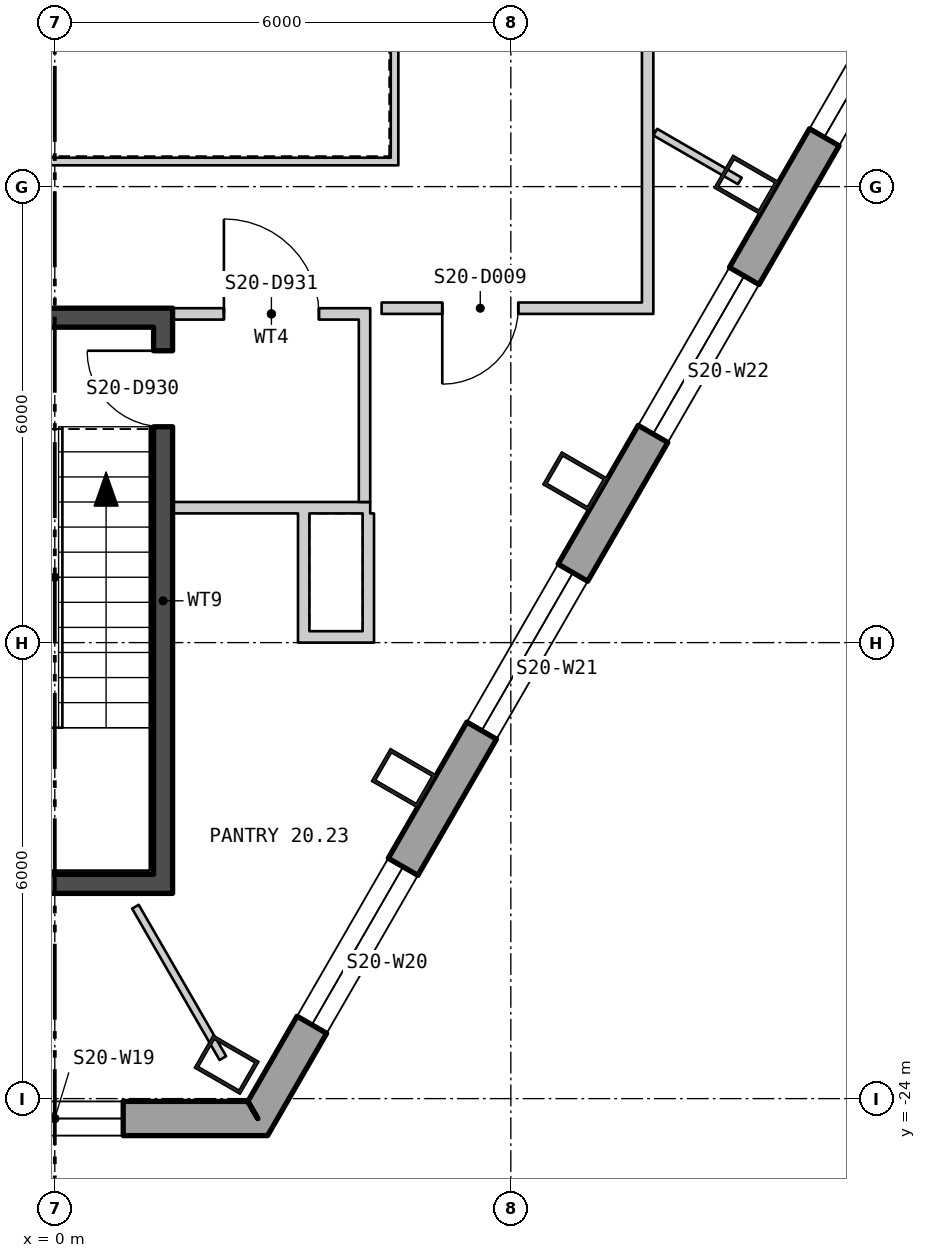
"""IFC4 building model, lengths in metres.
Left out: names, types, materials, properties, quantities, classifications, styles, units other than length and angle.
Written with IfcOpenShell. Run it as: python <this file> out.ifc"""

import sys

from ifc_helpers import new_model, si_unit, direction, frame, frame_2d, origin, origin_2d, place, context, subcontext, project, spatial, polyline, rectangle, hollow_rectangle, outline, extrude, element, fill, save


model = new_model("IFC4")
c1 = context("Model", 3, precision=1e-05, world=origin(), true_north=direction((0.0, 1.0)))
c2 = subcontext(c1, "Body", "Model", "MODEL_VIEW")
j1 = project(units=[si_unit("LENGTHUNIT", "METRE"), si_unit("PLANEANGLEUNIT", "RADIAN")], contexts=[c1])
p1 = place(None, origin())
s1 = spatial("IfcSite", under=j1, at=p1, CompositionType="ELEMENT")
p2 = place(p1, origin())
s2 = spatial("IfcBuilding", under=s1, at=p2, CompositionType="ELEMENT")
p3 = place(p2, frame((0.0, 0.0, 268.8)))
s3 = spatial("IfcBuildingStorey", under=s2, at=p3, CompositionType="ELEMENT", Elevation=268.8)
for number, where, z_axis, x_axis in (
    (1, (2.261, -23.554, 0.0), (0.0, 0.0, 1.0), (0.5, 0.866, 0.0)),
    (2, (4.592, -19.783, 0.0), (0.0, 0.0, 1.0), (0.5, 0.866, 0.0)),
    (3, (6.846, -15.879, 0.0), (0.0, 0.0, 1.0), (0.5, 0.866, 0.0)),
    (4, (9.1, -11.976, 0.0), (0.0, 0.0, 1.0), (0.5, 0.866, 0.0)),
):
    element("IfcColumn", number, at=place(p3, frame(where, z_axis=z_axis, x_axis=x_axis)), inside=s3, PredefinedType="COLUMN", context=c2, shape_type="SweptSolid", body=[
        extrude(hollow_rectangle(XDim=0.5, YDim=0.7, WallThickness=0.045, at=origin_2d()), origin(), (0.0, 0.0, 1.0), 3.9),
    ])
p4 = place(p3, frame((-2.67, -24.262, -0.18), z_axis=(0.0, 0.0, 1.0), x_axis=(1.0, 0.0, 0.0)))
e5 = element("IfcWall", 5, at=p4, inside=s3, PredefinedType="SOLIDWALL", context=c2, shape_type="SweptSolid", body=[
    extrude(outline(polyline([(-0.13, -0.225), (5.47, -0.225), (5.21, 0.225), (0.13, 0.225), (-0.13, -0.225)])), origin(), (0.0, 0.0, 1.0), 3.68),
])
p5 = place(p4, frame((1.77, 0.0, 1.08)))
e6 = element("IfcOpeningElement", 6, at=p5, cuts=e5, PredefinedType="OPENING", context=c2, shape_type="SweptSolid", body=[
    extrude(rectangle(XDim=1.8, YDim=2.0, at=frame_2d((0.9, 1.0))), frame((0.0, 0.235, 0.0), z_axis=(0.0, -1.0, 0.0), x_axis=(1.0, 0.0, 0.0)), (0.0, 0.0, 1.0), 0.47),
])
p6 = place(p3, frame((2.67, -24.262, -0.18), z_axis=(0.0, 0.0, 1.0), x_axis=(0.499999764979, 0.866025539474, 0.0)))
e7 = element("IfcWall", 7, at=p6, inside=s3, PredefinedType="SOLIDWALL", context=c2, shape_type="SweptSolid", body=[
    extrude(outline(polyline([(-0.13, -0.225), (45.87, -0.225), (45.61, 0.225), (0.13, 0.225), (-0.13, -0.225)])), origin(), (0.0, 0.0, 1.0), 3.68),
])
p7 = place(p6, frame((1.424, 0.0, 1.08)))
e8 = element("IfcOpeningElement", 8, at=p7, cuts=e7, PredefinedType="OPENING", context=c2, shape_type="SweptSolid", body=[
    extrude(rectangle(XDim=2.4, YDim=2.0, at=frame_2d((1.2, 1.0))), frame((0.0, 0.235, 0.0), z_axis=(0.0, -1.0, 0.0), x_axis=(1.0, 0.0, 0.0)), (0.0, 0.0, 1.0), 0.47),
])
p8 = place(p6, frame((5.893, 0.0, 1.08)))
e9 = element("IfcOpeningElement", 9, at=p8, cuts=e7, PredefinedType="OPENING", context=c2, shape_type="SweptSolid", body=[
    extrude(rectangle(XDim=2.4, YDim=2.0, at=frame_2d((1.2, 1.0))), frame((0.0, 0.235, 0.0), z_axis=(0.0, -1.0, 0.0), x_axis=(1.0, 0.0, 0.0)), (0.0, 0.0, 1.0), 0.47),
])
p9 = place(p6, frame((10.401, 0.0, 1.08)))
e10 = element("IfcOpeningElement", 10, at=p9, cuts=e7, PredefinedType="OPENING", context=c2, shape_type="SweptSolid", body=[
    extrude(rectangle(XDim=2.4, YDim=2.0, at=frame_2d((1.2, 1.0))), frame((0.0, 0.235, 0.0), z_axis=(0.0, -1.0, 0.0), x_axis=(1.0, 0.0, 0.0)), (0.0, 0.0, 1.0), 0.47),
])
p10 = place(p6, frame((14.909, 0.0, 1.08)))
e11 = element("IfcOpeningElement", 11, at=p10, cuts=e7, PredefinedType="OPENING", context=c2, shape_type="SweptSolid", body=[
    extrude(rectangle(XDim=2.4, YDim=2.0, at=frame_2d((1.2, 1.0))), frame((0.0, 0.235, 0.0), z_axis=(0.0, -1.0, 0.0), x_axis=(1.0, 0.0, 0.0)), (0.0, 0.0, 1.0), 0.47),
])
p11 = place(p6, frame((23.924, 0.0, 1.08)))
e12 = element("IfcOpeningElement", 12, at=p11, cuts=e7, PredefinedType="OPENING", context=c2, shape_type="SweptSolid", body=[
    extrude(rectangle(XDim=2.4, YDim=2.0, at=frame_2d((1.2, 1.0))), frame((0.0, 0.235, 0.0), z_axis=(0.0, -1.0, 0.0), x_axis=(1.0, 0.0, 0.0)), (0.0, 0.0, 1.0), 0.47),
])
p12 = place(p6, frame((28.431, 0.0, 1.08)))
e13 = element("IfcOpeningElement", 13, at=p12, cuts=e7, PredefinedType="OPENING", context=c2, shape_type="SweptSolid", body=[
    extrude(rectangle(XDim=2.4, YDim=2.0, at=frame_2d((1.2, 1.0))), frame((0.0, 0.235, 0.0), z_axis=(0.0, -1.0, 0.0), x_axis=(1.0, 0.0, 0.0)), (0.0, 0.0, 1.0), 0.47),
])
p13 = place(p6, frame((32.939, 0.0, 1.08)))
e14 = element("IfcOpeningElement", 14, at=p13, cuts=e7, PredefinedType="OPENING", context=c2, shape_type="SweptSolid", body=[
    extrude(rectangle(XDim=2.4, YDim=2.0, at=frame_2d((1.2, 1.0))), frame((0.0, 0.235, 0.0), z_axis=(0.0, -1.0, 0.0), x_axis=(1.0, 0.0, 0.0)), (0.0, 0.0, 1.0), 0.47),
])
p14 = place(p6, frame((37.447, 0.0, 1.08)))
e15 = element("IfcOpeningElement", 15, at=p14, cuts=e7, PredefinedType="OPENING", context=c2, shape_type="SweptSolid", body=[
    extrude(rectangle(XDim=2.4, YDim=2.0, at=frame_2d((1.2, 1.0))), frame((0.0, 0.235, 0.0), z_axis=(0.0, -1.0, 0.0), x_axis=(1.0, 0.0, 0.0)), (0.0, 0.0, 1.0), 0.47),
])
p15 = place(p6, frame((41.916, 0.0, 1.08)))
e16 = element("IfcOpeningElement", 16, at=p15, cuts=e7, PredefinedType="OPENING", context=c2, shape_type="SweptSolid", body=[
    extrude(rectangle(XDim=2.4, YDim=2.0, at=frame_2d((1.2, 1.0))), frame((0.0, 0.235, 0.0), z_axis=(0.0, -1.0, 0.0), x_axis=(1.0, 0.0, 0.0)), (0.0, 0.0, 1.0), 0.47),
])
p16 = place(p3, frame((-4.52, -11.67, 0.0), z_axis=(0.0, 0.0, 1.0), x_axis=(1.0, 0.0, 0.0)))
e17 = element("IfcWall", 17, at=p16, inside=s3, PredefinedType="PARTITIONING", context=c2, shape_type="SweptSolid", body=[
    extrude(rectangle(XDim=9.04, YDim=0.1, at=frame_2d((4.52, 0.0))), origin(), (0.0, 0.0, 1.0), 3.7),
])
p17 = place(p3, frame((4.47, -11.62, 0.0), z_axis=(0.0, 0.0, 1.0), x_axis=(0.0, 1.0, 0.0)))
e18 = element("IfcWall", 18, at=p17, inside=s3, PredefinedType="PARTITIONING", context=c2, shape_type="SweptSolid", body=[
    extrude(rectangle(XDim=8.04, YDim=0.1, at=frame_2d((4.02, 0.0))), origin(), (0.0, 0.0, 1.0), 3.7),
])
p18 = place(p3, frame((1.425, -21.05, 0.0), z_axis=(0.0, 0.0, 1.0), x_axis=(0.0, 1.0, 0.0)))
e19 = element("IfcWall", 19, at=p18, inside=s3, PredefinedType="SHEAR", context=c2, shape_type="SweptSolid", body=[
    extrude(rectangle(XDim=7.2, YDim=0.25, at=frame_2d((3.6, 0.0))), origin(), (0.0, 0.0, 1.0), 3.7),
])
p19 = place(p18, frame((5.89, 0.0, 0.0)))
e20 = element("IfcOpeningElement", 20, at=p19, cuts=e19, PredefinedType="OPENING", context=c2, shape_type="SweptSolid", body=[
    extrude(rectangle(XDim=1.0, YDim=2.1, at=frame_2d((0.5, 1.05))), frame((0.0, 0.135, 0.0), z_axis=(0.0, -1.0, 0.0), x_axis=(1.0, 0.0, 0.0)), (0.0, 0.0, 1.0), 0.27),
])
for number, where, z_axis, x_axis in (
    (21, (-1.55, -21.175, 0.0), (0.0, 0.0, 1.0), (1.0, 0.0, 0.0)),
    (22, (-1.55, -13.725, 0.0), (0.0, 0.0, 1.0), (1.0, 0.0, 0.0)),
):
    element("IfcWall", number, at=place(p3, frame(where, z_axis=z_axis, x_axis=x_axis)), inside=s3, PredefinedType="SHEAR", context=c2, shape_type="SweptSolid", body=[
        extrude(rectangle(XDim=3.1, YDim=0.25, at=frame_2d((1.55, 0.0))), origin(), (0.0, 0.0, 1.0), 3.7),
    ])
p20 = place(p3, frame((1.55, -16.225, 0.0), z_axis=(0.0, 0.0, 1.0), x_axis=(1.0, 0.0, 0.0)))
e23 = element("IfcWall", 23, at=p20, inside=s3, PredefinedType="PARTITIONING", context=c2, shape_type="SweptSolid", body=[
    extrude(rectangle(XDim=2.6, YDim=0.15, at=frame_2d((1.3, 0.0))), origin(), (0.0, 0.0, 1.0), 3.7),
])
p21 = place(p3, frame((4.075, -16.15, 0.0), z_axis=(0.0, 0.0, 1.0), x_axis=(0.0, 1.0, 0.0)))
e24 = element("IfcWall", 24, at=p21, inside=s3, PredefinedType="PARTITIONING", context=c2, shape_type="SweptSolid", body=[
    extrude(rectangle(XDim=2.4, YDim=0.15, at=frame_2d((1.2, 0.0))), origin(), (0.0, 0.0, 1.0), 3.7),
])
p22 = place(p3, frame((1.55, -13.675, 0.0), z_axis=(0.0, 0.0, 1.0), x_axis=(1.0, 0.0, 0.0)))
e25 = element("IfcWall", 25, at=p22, inside=s3, PredefinedType="PARTITIONING", context=c2, shape_type="SweptSolid", body=[
    extrude(rectangle(XDim=2.6, YDim=0.15, at=frame_2d((1.3, 0.0))), origin(), (0.0, 0.0, 1.0), 2.79),
])
p23 = place(p22, frame((0.675, 0.0, 0.0)))
e26 = element("IfcOpeningElement", 26, at=p23, cuts=e25, PredefinedType="OPENING", context=c2, shape_type="SweptSolid", body=[
    extrude(rectangle(XDim=1.25, YDim=2.1, at=frame_2d((0.625, 1.05))), frame((0.0, 0.085, 0.0), z_axis=(0.0, -1.0, 0.0), x_axis=(1.0, 0.0, 0.0)), (0.0, 0.0, 1.0), 0.17),
])
p24 = place(p3, frame((3.275, -18.0, 0.0), z_axis=(0.0, 0.0, 1.0), x_axis=(0.0, 1.0, 0.0)))
e27 = element("IfcWall", 27, at=p24, inside=s3, PredefinedType="PARTITIONING", context=c2, shape_type="SweptSolid", body=[
    extrude(rectangle(XDim=1.7, YDim=0.15, at=frame_2d((0.85, 0.0))), origin(), (0.0, 0.0, 1.0), 3.2),
])
p25 = place(p3, frame((3.35, -17.925, 0.0), z_axis=(0.0, 0.0, 1.0), x_axis=(1.0, 0.0, 0.0)))
e28 = element("IfcWall", 28, at=p25, inside=s3, PredefinedType="PARTITIONING", context=c2, shape_type="SweptSolid", body=[
    extrude(rectangle(XDim=0.7, YDim=0.15, at=frame_2d((0.35, 0.0))), origin(), (0.0, 0.0, 1.0), 3.7),
])
p26 = place(p3, frame((4.125, -18.0, 0.0), z_axis=(0.0, 0.0, 1.0), x_axis=(0.0, 1.0, 0.0)))
e29 = element("IfcWall", 29, at=p26, inside=s3, PredefinedType="PARTITIONING", context=c2, shape_type="SweptSolid", body=[
    extrude(rectangle(XDim=1.7, YDim=0.15, at=frame_2d((0.85, 0.0))), origin(), (0.0, 0.0, 1.0), 3.7),
])
p27 = place(p3, frame((1.061, -21.475, 0.0), z_axis=(0.0, 0.0, 1.0), x_axis=(0.499973348067, -0.866040790738, 0.0)))
e30 = element("IfcWall", 30, at=p27, inside=s3, PredefinedType="PARTITIONING", context=c2, shape_type="SweptSolid", body=[
    extrude(rectangle(XDim=2.3, YDim=0.1, at=frame_2d((1.15, 0.0))), origin(), (0.0, 0.0, 1.0), 3.7),
])
p28 = place(p3, frame((4.3, -13.6, 0.0), z_axis=(0.0, 0.0, 1.0), x_axis=(1.0, 0.0, 0.0)))
e31 = element("IfcWall", 31, at=p28, inside=s3, PredefinedType="PARTITIONING", context=c2, shape_type="SweptSolid", body=[
    extrude(rectangle(XDim=3.425, YDim=0.15, at=frame_2d((1.712, 0.0))), origin(), (0.0, 0.0, 1.0), 2.79),
])
p29 = place(p28, frame((0.798, 0.0, 0.0)))
e32 = element("IfcOpeningElement", 32, at=p29, cuts=e31, PredefinedType="OPENING", context=c2, shape_type="SweptSolid", body=[
    extrude(rectangle(XDim=1.0, YDim=2.1, at=frame_2d((0.5, 1.05))), frame((0.0, 0.085, 0.0), z_axis=(0.0, -1.0, 0.0), x_axis=(1.0, 0.0, 0.0)), (0.0, 0.0, 1.0), 0.17),
])
p30 = place(p3, frame((7.8, -13.675, 0.0), z_axis=(0.0, 0.0, 1.0), x_axis=(0.0, 1.0, 0.0)))
e33 = element("IfcWall", 33, at=p30, inside=s3, PredefinedType="PARTITIONING", context=c2, shape_type="SweptSolid", body=[
    extrude(rectangle(XDim=17.675, YDim=0.15, at=frame_2d((8.838, 0.0))), origin(), (0.0, 0.0, 1.0), 3.7),
])
p31 = place(p30, frame((4.552, 0.0, 0.0)))
e34 = element("IfcOpeningElement", 34, at=p31, cuts=e33, PredefinedType="OPENING", context=c2, shape_type="SweptSolid", body=[
    extrude(rectangle(XDim=1.0, YDim=2.1, at=frame_2d((0.5, 1.05))), frame((0.0, 0.085, 0.0), z_axis=(0.0, -1.0, 0.0), x_axis=(1.0, 0.0, 0.0)), (0.0, 0.0, 1.0), 0.17),
])
p32 = place(p30, frame((13.287, 0.0, 0.0)))
e35 = element("IfcOpeningElement", 35, at=p32, cuts=e33, PredefinedType="OPENING", context=c2, shape_type="SweptSolid", body=[
    extrude(rectangle(XDim=1.0, YDim=2.1, at=frame_2d((0.5, 1.05))), frame((0.0, 0.085, 0.0), z_axis=(0.0, -1.0, 0.0), x_axis=(1.0, 0.0, 0.0)), (0.0, 0.0, 1.0), 0.17),
])
p33 = place(p30, frame((16.275, 0.0, 0.0)))
e36 = element("IfcOpeningElement", 36, at=p33, cuts=e33, PredefinedType="OPENING", context=c2, shape_type="SweptSolid", body=[
    extrude(rectangle(XDim=1.0, YDim=2.1, at=frame_2d((0.5, 1.05))), frame((0.0, 0.085, 0.0), z_axis=(0.0, -1.0, 0.0), x_axis=(1.0, 0.0, 0.0)), (0.0, 0.0, 1.0), 0.17),
])
p34 = place(p3, frame((7.9, -11.283, 0.0), z_axis=(0.0, 0.0, 1.0), x_axis=(0.865887538919, -0.500238712961, 0.0)))
e37 = element("IfcWall", 37, at=p34, inside=s3, PredefinedType="PARTITIONING", context=c2, shape_type="SweptSolid", body=[
    extrude(rectangle(XDim=1.285, YDim=0.1, at=frame_2d((0.643, 0.0))), origin(), (0.0, 0.0, 1.0), 3.7),
])
p35 = place(p5, origin())
e38 = element("IfcWindow", 38, at=p35, inside=s3, PartitioningType="SINGLE_PANEL", PredefinedType="WINDOW", context=c2, shape_type="SweptSolid", body=[
    extrude(rectangle(XDim=1.8, YDim=2.0, at=frame_2d((0.9, 1.0))), frame((0.0, 0.105, 0.0), z_axis=(0.0, -1.0, 0.0), x_axis=(1.0, 0.0, 0.0)), (0.0, 0.0, 1.0), 0.06),
])
fill(e6, e38)
p36 = place(p7, origin())
e39 = element("IfcWindow", 39, at=p36, inside=s3, PartitioningType="SINGLE_PANEL", PredefinedType="WINDOW", context=c2, shape_type="SweptSolid", body=[
    extrude(rectangle(XDim=2.4, YDim=2.0, at=frame_2d((1.2, 1.0))), frame((0.0, 0.105, 0.0), z_axis=(0.0, -1.0, 0.0), x_axis=(1.0, 0.0, 0.0)), (0.0, 0.0, 1.0), 0.06),
])
fill(e8, e39)
p37 = place(p8, origin())
e40 = element("IfcWindow", 40, at=p37, inside=s3, PartitioningType="SINGLE_PANEL", PredefinedType="WINDOW", context=c2, shape_type="SweptSolid", body=[
    extrude(rectangle(XDim=2.4, YDim=2.0, at=frame_2d((1.2, 1.0))), frame((0.0, 0.105, 0.0), z_axis=(0.0, -1.0, 0.0), x_axis=(1.0, 0.0, 0.0)), (0.0, 0.0, 1.0), 0.06),
])
fill(e9, e40)
p38 = place(p9, origin())
e41 = element("IfcWindow", 41, at=p38, inside=s3, PartitioningType="SINGLE_PANEL", PredefinedType="WINDOW", context=c2, shape_type="SweptSolid", body=[
    extrude(rectangle(XDim=2.4, YDim=2.0, at=frame_2d((1.2, 1.0))), frame((0.0, 0.105, 0.0), z_axis=(0.0, -1.0, 0.0), x_axis=(1.0, 0.0, 0.0)), (0.0, 0.0, 1.0), 0.06),
])
fill(e10, e41)
p39 = place(p10, origin())
e42 = element("IfcWindow", 42, at=p39, inside=s3, PartitioningType="SINGLE_PANEL", PredefinedType="WINDOW", context=c2, shape_type="SweptSolid", body=[
    extrude(rectangle(XDim=2.4, YDim=2.0, at=frame_2d((1.2, 1.0))), frame((0.0, 0.105, 0.0), z_axis=(0.0, -1.0, 0.0), x_axis=(1.0, 0.0, 0.0)), (0.0, 0.0, 1.0), 0.06),
])
fill(e11, e42)
p40 = place(p19, origin())
e43 = element("IfcDoor", 43, at=p40, inside=s3, OperationType="SINGLE_SWING_LEFT", PredefinedType="DOOR", context=c2, shape_type="SweptSolid", body=[
    extrude(rectangle(XDim=1.0, YDim=2.1, at=frame_2d((0.5, 1.05))), frame((0.0, 0.025, 0.0), z_axis=(0.0, -1.0, 0.0), x_axis=(1.0, 0.0, 0.0)), (0.0, 0.0, 1.0), 0.05),
])
fill(e20, e43)
p41 = place(p23, origin())
e44 = element("IfcDoor", 44, at=p41, inside=s3, OperationType="SINGLE_SWING_RIGHT", PredefinedType="DOOR", context=c2, shape_type="SweptSolid", body=[
    extrude(rectangle(XDim=1.25, YDim=2.1, at=frame_2d((0.625, 1.05))), frame((0.0, 0.025, 0.0), z_axis=(0.0, -1.0, 0.0), x_axis=(1.0, 0.0, 0.0)), (0.0, 0.0, 1.0), 0.05),
])
fill(e26, e44)
p42 = place(p29, origin())
e45 = element("IfcDoor", 45, at=p42, inside=s3, OperationType="SINGLE_SWING_LEFT", PredefinedType="DOOR", context=c2, shape_type="SweptSolid", body=[
    extrude(rectangle(XDim=1.0, YDim=2.1, at=frame_2d((0.5, 1.05))), frame((0.0, 0.025, 0.0), z_axis=(0.0, -1.0, 0.0), x_axis=(1.0, 0.0, 0.0)), (0.0, 0.0, 1.0), 0.05),
])
fill(e32, e45)
save(model, sys.argv[1])
